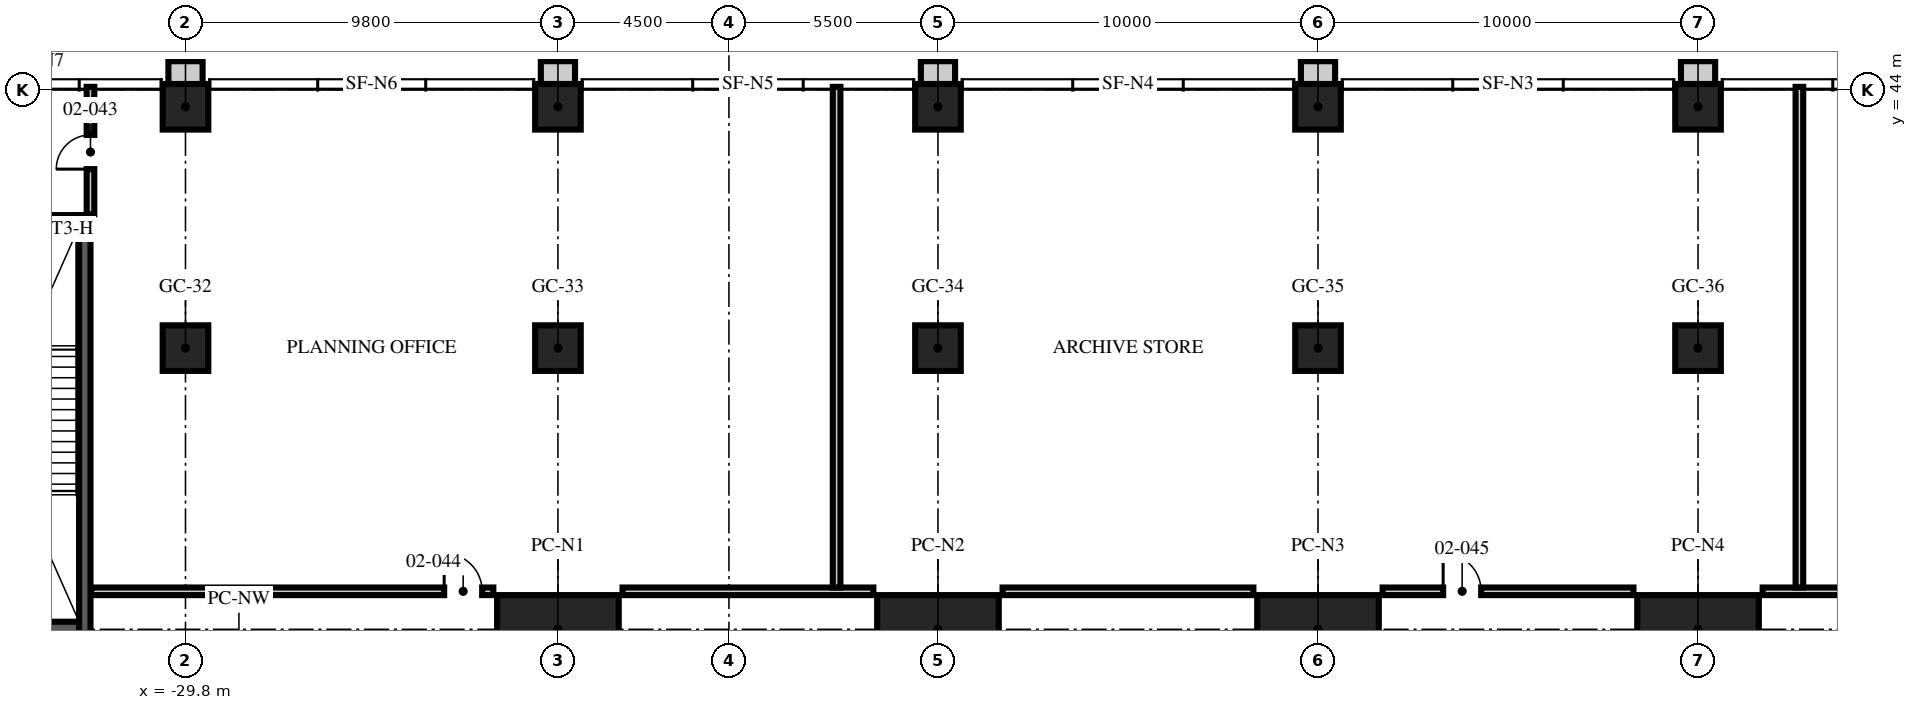
"""IFC4 building model, lengths in metres.
Left out: names, types, materials, properties, quantities, classifications, styles, units other than length and angle.
Written with IfcOpenShell. Run it as: python <this file> out.ifc"""

import sys

from ifc_helpers import new_model, si_unit, direction, frame, frame_2d, origin, origin_2d, place, context, subcontext, project, spatial, rectangle, hollow_rectangle, extrude, element, fill, save


model = new_model("IFC4")
c1 = context("Model", 3, precision=1e-05, world=origin(), true_north=direction((0.0, 1.0)))
c2 = subcontext(c1, "Body", "Model", "MODEL_VIEW")
j1 = project(units=[si_unit("LENGTHUNIT", "METRE"), si_unit("PLANEANGLEUNIT", "RADIAN")], contexts=[c1])
p1 = place(None, origin())
s1 = spatial("IfcSite", under=j1, at=p1, CompositionType="ELEMENT")
p2 = place(p1, origin())
s2 = spatial("IfcBuilding", under=s1, at=p2, CompositionType="ELEMENT")
p3 = place(p2, frame((0.0, 0.0, 11.0)))
s3 = spatial("IfcBuildingStorey", under=s2, at=p3, CompositionType="ELEMENT", Elevation=11.0)
for number, where, z_axis, x_axis in (
    (1, (-20.0, 29.8, 0.0), (0.0, 0.0, 1.0), (1.0, 0.0, 0.0)),
    (2, (-10.0, 29.8, 0.0), (0.0, 0.0, 1.0), (1.0, 0.0, 0.0)),
    (3, (0.0, 29.8, 0.0), (0.0, 0.0, 1.0), (1.0, 0.0, 0.0)),
    (4, (10.0, 29.8, 0.0), (0.0, 0.0, 1.0), (1.0, 0.0, 0.0)),
):
    element("IfcColumn", number, at=place(p3, frame(where, z_axis=z_axis, x_axis=x_axis)), inside=s3, PredefinedType="COLUMN", context=c2, shape_type="SweptSolid", body=[
        extrude(hollow_rectangle(XDim=3.2, YDim=1.8, WallThickness=0.2, at=origin_2d()), origin(), (0.0, 0.0, 1.0), 5.0),
    ])
for number, where, z_axis, x_axis in (
    (5, (-29.8, 37.2, 0.0), (0.0, 0.0, 1.0), (1.0, 0.0, 0.0)),
    (6, (-20.0, 37.2, 0.0), (0.0, 0.0, 1.0), (1.0, 0.0, 0.0)),
    (7, (-10.0, 37.2, 0.0), (0.0, 0.0, 1.0), (1.0, 0.0, 0.0)),
    (8, (0.0, 37.2, 0.0), (0.0, 0.0, 1.0), (1.0, 0.0, 0.0)),
    (9, (10.0, 37.2, 0.0), (0.0, 0.0, 1.0), (1.0, 0.0, 0.0)),
    (10, (-29.8, 43.55, 0.0), (0.0, 0.0, 1.0), (1.0, 0.0, 0.0)),
    (11, (-20.0, 43.55, 0.0), (0.0, 0.0, 1.0), (1.0, 0.0, 0.0)),
    (12, (-10.0, 43.55, 0.0), (0.0, 0.0, 1.0), (1.0, 0.0, 0.0)),
    (13, (0.0, 43.55, 0.0), (0.0, 0.0, 1.0), (1.0, 0.0, 0.0)),
    (14, (10.0, 43.55, 0.0), (0.0, 0.0, 1.0), (1.0, 0.0, 0.0)),
):
    element("IfcColumn", number, at=place(p3, frame(where, z_axis=z_axis, x_axis=x_axis)), inside=s3, PredefinedType="COLUMN", context=c2, shape_type="SweptSolid", body=[
        extrude(rectangle(XDim=1.2, YDim=1.2, at=origin_2d()), origin(), (0.0, 0.0, 1.0), 5.0),
    ])
for number, where, z_axis, x_axis in (
    (15, (10.45, 44.375, 0.0), (0.0, 0.0, 1.0), (-1.0, 0.0, 0.0)),
    (16, (0.45, 44.375, 0.0), (0.0, 0.0, 1.0), (-1.0, 0.0, 0.0)),
    (17, (-9.55, 44.375, 0.0), (0.0, 0.0, 1.0), (-1.0, 0.0, 0.0)),
    (18, (-19.55, 44.375, 0.0), (0.0, 0.0, 1.0), (-1.0, 0.0, 0.0)),
    (19, (-29.35, 44.375, 0.0), (0.0, 0.0, 1.0), (-1.0, 0.0, 0.0)),
):
    element("IfcWall", number, at=place(p3, frame(where, z_axis=z_axis, x_axis=x_axis)), inside=s3, PredefinedType="SOLIDWALL", context=c2, shape_type="SweptSolid", body=[
        extrude(rectangle(XDim=0.9, YDim=0.75, at=frame_2d((0.45, 0.0))), origin(), (0.0, 0.0, 1.0), 5.0),
    ])
p4 = place(p3, frame((-38.0, 29.85, 0.0), z_axis=(0.0, 0.0, 1.0), x_axis=(1.0, 0.0, 0.0)))
e20 = element("IfcWall", 20, at=p4, inside=s3, PredefinedType="SOLIDWALL", context=c2, shape_type="SweptSolid", body=[
    extrude(rectangle(XDim=5.4, YDim=0.3, at=frame_2d((2.7, 0.0))), origin(), (0.0, 0.0, 1.0), 4.7),
])
p5 = place(p4, frame((2.35, 0.0, 0.0)))
e21 = element("IfcOpeningElement", 21, at=p5, cuts=e20, PredefinedType="OPENING", context=c2, shape_type="SweptSolid", body=[
    extrude(rectangle(XDim=1.5, YDim=2.1, at=frame_2d((0.75, 1.05))), frame((0.0, 0.16, 0.0), z_axis=(0.0, -1.0, 0.0), x_axis=(1.0, 0.0, 0.0)), (0.0, 0.0, 1.0), 0.32),
])
p6 = place(p3, frame((-32.45, 29.7, 0.0), z_axis=(0.0, 0.0, 1.0), x_axis=(0.0, 1.0, 0.0)))
e22 = element("IfcWall", 22, at=p6, inside=s3, PredefinedType="SOLIDWALL", context=c2, shape_type="SweptSolid", body=[
    extrude(rectangle(XDim=11.0, YDim=0.3, at=frame_2d((5.5, 0.0))), origin(), (0.0, 0.0, 1.0), 4.7),
])
p7 = place(p3, frame((-37.2, 40.55, 0.0), z_axis=(0.0, 0.0, 1.0), x_axis=(1.0, 0.0, 0.0)))
e23 = element("IfcWall", 23, at=p7, inside=s3, PredefinedType="SOLIDWALL", context=c2, shape_type="SweptSolid", body=[
    extrude(rectangle(XDim=4.6, YDim=0.3, at=frame_2d((2.3, 0.0))), origin(), (0.0, 0.0, 1.0), 4.7),
])
p8 = place(p3, frame((-32.28, 30.8, 0.0), z_axis=(0.0, 0.0, 1.0), x_axis=(1.0, 0.0, 0.0)))
e24 = element("IfcWall", 24, at=p8, inside=s3, PredefinedType="SOLIDWALL", context=c2, shape_type="SweptSolid", body=[
    extrude(rectangle(XDim=10.58, YDim=0.2, at=frame_2d((5.29, 0.0))), origin(), (0.0, 0.0, 1.0), 4.7),
])
p9 = place(p8, frame((9.287, 0.0, 0.0)))
e25 = element("IfcOpeningElement", 25, at=p9, cuts=e24, PredefinedType="OPENING", context=c2, shape_type="SweptSolid", body=[
    extrude(rectangle(XDim=1.0, YDim=2.1, at=frame_2d((0.5, 1.05))), frame((0.0, 0.11, 0.0), z_axis=(0.0, -1.0, 0.0), x_axis=(1.0, 0.0, 0.0)), (0.0, 0.0, 1.0), 0.22),
])
for number, where, z_axis, x_axis in (
    (26, (-18.3, 30.8, 0.0), (0.0, 0.0, 1.0), (1.0, 0.0, 0.0)),
    (27, (-8.3, 30.8, 0.0), (0.0, 0.0, 1.0), (1.0, 0.0, 0.0)),
):
    element("IfcWall", number, at=place(p3, frame(where, z_axis=z_axis, x_axis=x_axis)), inside=s3, PredefinedType="SOLIDWALL", context=c2, shape_type="SweptSolid", body=[
        extrude(rectangle(XDim=6.6, YDim=0.2, at=frame_2d((3.3, 0.0))), origin(), (0.0, 0.0, 1.0), 4.7),
    ])
p10 = place(p3, frame((1.7, 30.8, 0.0), z_axis=(0.0, 0.0, 1.0), x_axis=(1.0, 0.0, 0.0)))
e28 = element("IfcWall", 28, at=p10, inside=s3, PredefinedType="SOLIDWALL", context=c2, shape_type="SweptSolid", body=[
    extrude(rectangle(XDim=6.6, YDim=0.2, at=frame_2d((3.3, 0.0))), origin(), (0.0, 0.0, 1.0), 4.7),
])
p11 = place(p10, frame((1.593, 0.0, 0.0)))
e29 = element("IfcOpeningElement", 29, at=p11, cuts=e28, PredefinedType="OPENING", context=c2, shape_type="SweptSolid", body=[
    extrude(rectangle(XDim=1.0, YDim=2.1, at=frame_2d((0.5, 1.05))), frame((0.0, 0.11, 0.0), z_axis=(0.0, -1.0, 0.0), x_axis=(1.0, 0.0, 0.0)), (0.0, 0.0, 1.0), 0.22),
])
p12 = place(p3, frame((11.7, 30.8, 0.0), z_axis=(0.0, 0.0, 1.0), x_axis=(1.0, 0.0, 0.0)))
e30 = element("IfcWall", 30, at=p12, inside=s3, PredefinedType="SOLIDWALL", context=c2, shape_type="SweptSolid", body=[
    extrude(rectangle(XDim=6.6, YDim=0.2, at=frame_2d((3.3, 0.0))), origin(), (0.0, 0.0, 1.0), 4.7),
])
for number, where, z_axis, x_axis in (
    (31, (-12.667, 30.9, 0.0), (0.0, 0.0, 1.0), (0.0, 1.0, 0.0)),
    (32, (12.667, 30.9, 0.0), (0.0, 0.0, 1.0), (0.0, 1.0, 0.0)),
):
    element("IfcWall", number, at=place(p3, frame(where, z_axis=z_axis, x_axis=x_axis)), inside=s3, PredefinedType="SOLIDWALL", context=c2, shape_type="SweptSolid", body=[
        extrude(rectangle(XDim=13.175, YDim=0.2, at=frame_2d((6.587, 0.0))), origin(), (0.0, 0.0, 1.0), 3.7),
    ])
p13 = place(p3, frame((-32.3, 40.72, 0.0), z_axis=(0.0, 0.0, 1.0), x_axis=(0.0, 1.0, 0.0)))
e33 = element("IfcWall", 33, at=p13, inside=s3, PredefinedType="SOLIDWALL", context=c2, shape_type="SweptSolid", body=[
    extrude(rectangle(XDim=3.355, YDim=0.2, at=frame_2d((1.677, 0.0))), origin(), (0.0, 0.0, 1.0), 3.7),
])
p14 = place(p13, frame((1.19, 0.0, 0.0)))
e34 = element("IfcOpeningElement", 34, at=p14, cuts=e33, PredefinedType="OPENING", context=c2, shape_type="SweptSolid", body=[
    extrude(rectangle(XDim=0.9, YDim=2.1, at=frame_2d((0.45, 1.05))), frame((0.0, 0.11, 0.0), z_axis=(0.0, -1.0, 0.0), x_axis=(1.0, 0.0, 0.0)), (0.0, 0.0, 1.0), 0.22),
])
p15 = place(p14, origin())
e35 = element("IfcDoor", 35, at=p15, inside=s3, OperationType="SINGLE_SWING_LEFT", PredefinedType="DOOR", context=c2, shape_type="SweptSolid", body=[
    extrude(rectangle(XDim=0.9, YDim=2.1, at=frame_2d((0.45, 1.05))), frame((0.0, 0.025, 0.0), z_axis=(0.0, -1.0, 0.0), x_axis=(1.0, 0.0, 0.0)), (0.0, 0.0, 1.0), 0.05),
])
fill(e34, e35)
p16 = place(p9, origin())
e36 = element("IfcDoor", 36, at=p16, inside=s3, OperationType="SINGLE_SWING_LEFT", PredefinedType="DOOR", context=c2, shape_type="SweptSolid", body=[
    extrude(rectangle(XDim=1.0, YDim=2.1, at=frame_2d((0.5, 1.05))), frame((0.0, 0.025, 0.0), z_axis=(0.0, -1.0, 0.0), x_axis=(1.0, 0.0, 0.0)), (0.0, 0.0, 1.0), 0.05),
])
fill(e25, e36)
p17 = place(p11, origin())
e37 = element("IfcDoor", 37, at=p17, inside=s3, OperationType="SINGLE_SWING_LEFT", PredefinedType="DOOR", context=c2, shape_type="SweptSolid", body=[
    extrude(rectangle(XDim=1.0, YDim=2.1, at=frame_2d((0.5, 1.05))), frame((0.0, 0.025, 0.0), z_axis=(0.0, -1.0, 0.0), x_axis=(1.0, 0.0, 0.0)), (0.0, 0.0, 1.0), 0.05),
])
fill(e29, e37)
save(model, sys.argv[1])
